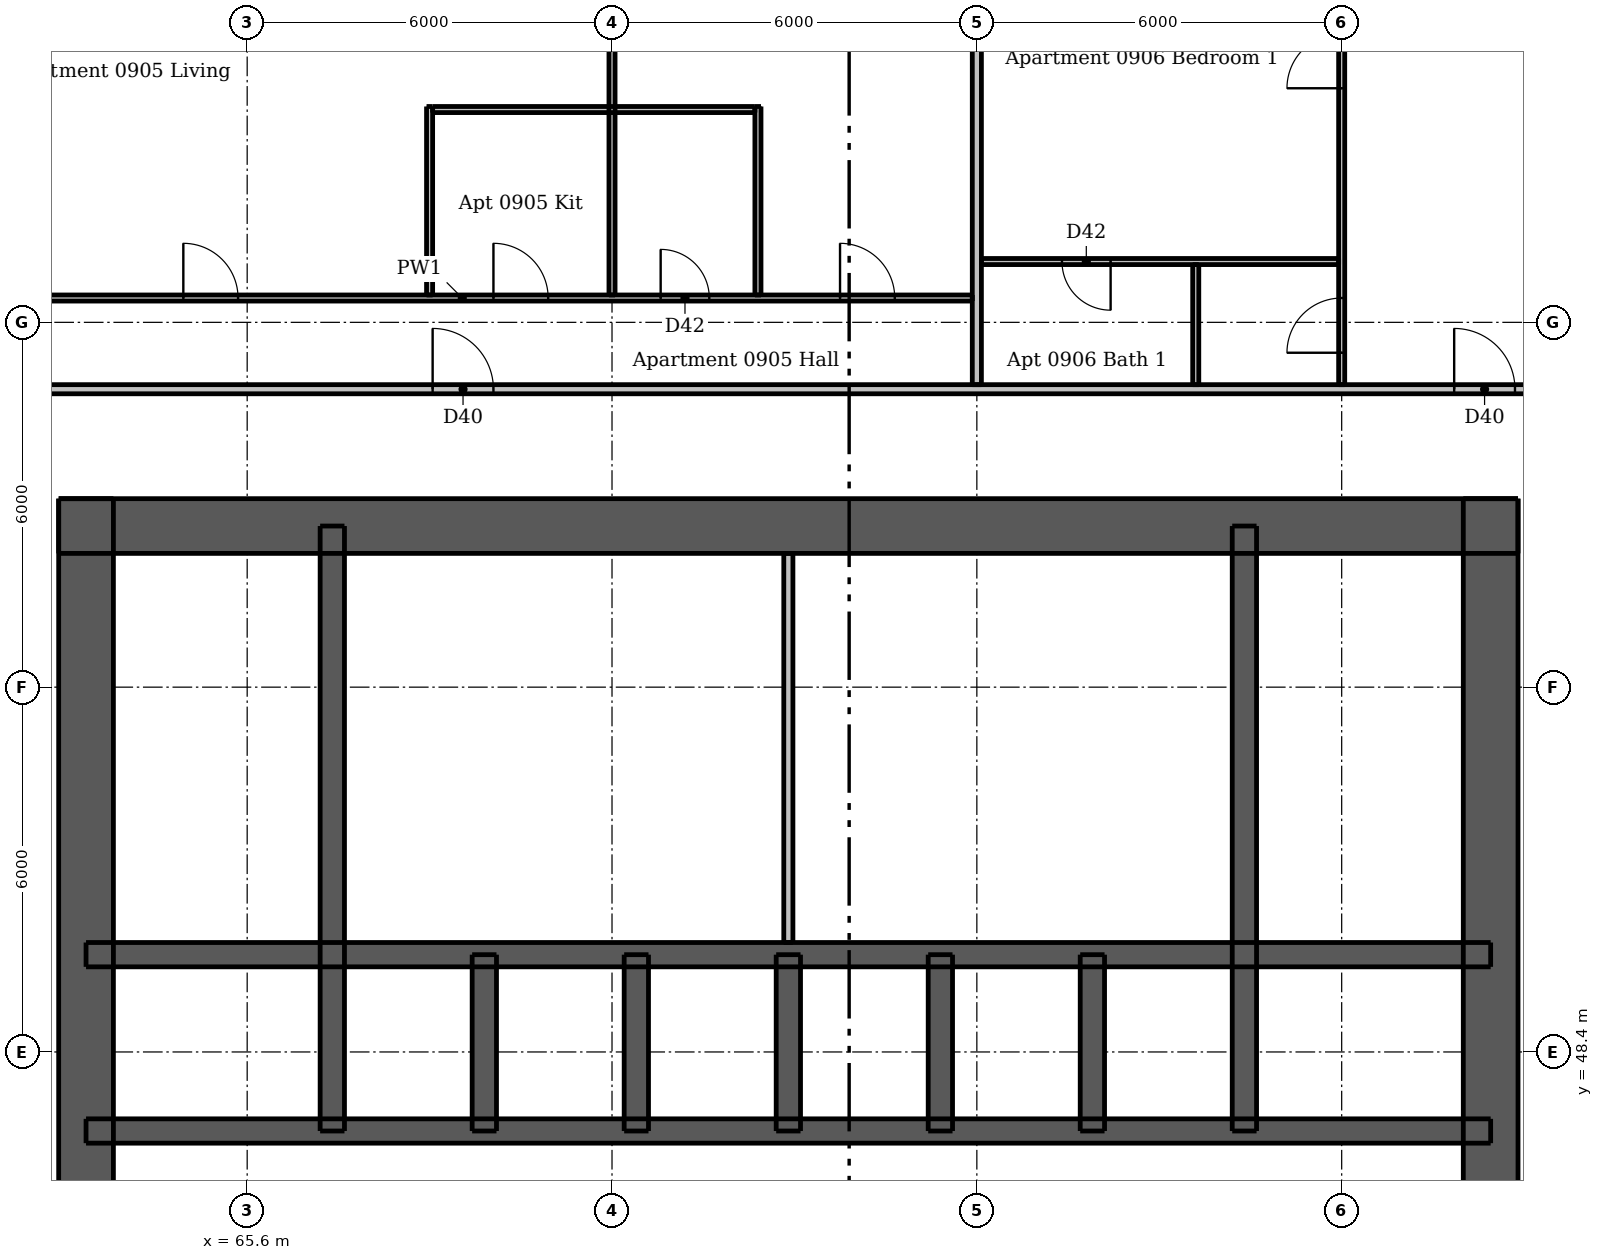
"""IFC4 building model, lengths in metres.
Left out: names, types, materials, properties, quantities, classifications, styles, units other than length and angle.
Written with IfcOpenShell. Run it as: python <this file> out.ifc"""

import sys

from ifc_helpers import new_model, si_unit, direction, frame, frame_2d, origin, place, context, subcontext, project, spatial, rectangle, extrude, element, fill, save


model = new_model("IFC4")
c1 = context("Model", 3, precision=1e-05, world=origin(), true_north=direction((0.0, 1.0)))
c2 = subcontext(c1, "Body", "Model", "MODEL_VIEW")
j1 = project(units=[si_unit("LENGTHUNIT", "METRE"), si_unit("PLANEANGLEUNIT", "RADIAN")], contexts=[c1])
p1 = place(None, origin())
s1 = spatial("IfcSite", under=j1, at=p1, CompositionType="ELEMENT")
p2 = place(p1, origin())
s2 = spatial("IfcBuilding", under=s1, at=p2, CompositionType="ELEMENT")
p3 = place(p2, frame((0.0, 0.0, 36.7)))
s3 = spatial("IfcBuildingStorey", under=s2, at=p3, CompositionType="ELEMENT", Elevation=36.7)
p4 = place(p3, frame((62.5, 57.05, 0.0), z_axis=(0.0, 0.0, 1.0), x_axis=(1.0, 0.0, 0.0)))
e1 = element("IfcWall", 1, at=p4, inside=s3, PredefinedType="SHEAR", context=c2, shape_type="SweptSolid", body=[
    extrude(rectangle(XDim=24.0, YDim=0.9, at=frame_2d((12.0, 0.0))), origin(), (0.0, 0.0, 1.0), 3.05),
])
p5 = place(p4, frame((20.85, 0.0, 0.0)))
e2 = element("IfcOpeningElement", 2, at=p5, cuts=e1, PredefinedType="OPENING", context=c2, shape_type="SweptSolid", body=[
    extrude(rectangle(XDim=1.1, YDim=2.1, at=frame_2d((0.55, 1.05))), frame((0.0, 0.46, 0.0), z_axis=(0.0, -1.0, 0.0), x_axis=(1.0, 0.0, 0.0)), (0.0, 0.0, 1.0), 0.92),
])
p6 = place(p4, frame((2.05, 0.0, 0.0)))
e3 = element("IfcOpeningElement", 3, at=p6, cuts=e1, PredefinedType="OPENING", context=c2, shape_type="SweptSolid", body=[
    extrude(rectangle(XDim=1.1, YDim=2.1, at=frame_2d((0.55, 1.05))), frame((0.0, 0.46, 0.0), z_axis=(0.0, -1.0, 0.0), x_axis=(1.0, 0.0, 0.0)), (0.0, 0.0, 1.0), 0.92),
])
p7 = place(p4, frame((7.9, 0.0, 0.0)))
e4 = element("IfcOpeningElement", 4, at=p7, cuts=e1, PredefinedType="OPENING", context=c2, shape_type="SweptSolid", body=[
    extrude(rectangle(XDim=0.9, YDim=2.1, at=frame_2d((0.45, 1.05))), frame((0.0, 0.46, 0.0), z_axis=(0.0, -1.0, 0.0), x_axis=(1.0, 0.0, 0.0)), (0.0, 0.0, 1.0), 0.92),
])
p8 = place(p4, frame((15.2, 0.0, 0.0)))
e5 = element("IfcOpeningElement", 5, at=p8, cuts=e1, PredefinedType="OPENING", context=c2, shape_type="SweptSolid", body=[
    extrude(rectangle(XDim=0.9, YDim=2.1, at=frame_2d((0.45, 1.05))), frame((0.0, 0.46, 0.0), z_axis=(0.0, -1.0, 0.0), x_axis=(1.0, 0.0, 0.0)), (0.0, 0.0, 1.0), 0.92),
])
p9 = place(p3, frame((62.95, 33.5, 0.0), z_axis=(0.0, 0.0, 1.0), x_axis=(0.0, 1.0, 0.0)))
e6 = element("IfcWall", 6, at=p9, inside=s3, PredefinedType="SHEAR", context=c2, shape_type="SweptSolid", body=[
    extrude(rectangle(XDim=24.0, YDim=0.9, at=frame_2d((12.0, 0.0))), origin(), (0.0, 0.0, 1.0), 3.05),
])
p10 = place(p9, frame((11.2, 0.0, 0.0)))
e7 = element("IfcOpeningElement", 7, at=p10, cuts=e6, PredefinedType="OPENING", context=c2, shape_type="SweptSolid", body=[
    extrude(rectangle(XDim=1.6, YDim=2.1, at=frame_2d((0.8, 1.05))), frame((0.0, 0.46, 0.0), z_axis=(0.0, -1.0, 0.0), x_axis=(1.0, 0.0, 0.0)), (0.0, 0.0, 1.0), 0.92),
])
p11 = place(p3, frame((86.05, 33.5, 0.0), z_axis=(0.0, 0.0, 1.0), x_axis=(0.0, 1.0, 0.0)))
e8 = element("IfcWall", 8, at=p11, inside=s3, PredefinedType="SHEAR", context=c2, shape_type="SweptSolid", body=[
    extrude(rectangle(XDim=24.0, YDim=0.9, at=frame_2d((12.0, 0.0))), origin(), (0.0, 0.0, 1.0), 3.05),
])
p12 = place(p11, frame((11.2, 0.0, 0.0)))
e9 = element("IfcOpeningElement", 9, at=p12, cuts=e8, PredefinedType="OPENING", context=c2, shape_type="SweptSolid", body=[
    extrude(rectangle(XDim=1.6, YDim=2.1, at=frame_2d((0.8, 1.05))), frame((0.0, 0.46, 0.0), z_axis=(0.0, -1.0, 0.0), x_axis=(1.0, 0.0, 0.0)), (0.0, 0.0, 1.0), 0.92),
])
p13 = place(p3, frame((62.95, 47.1, 0.0), z_axis=(0.0, 0.0, 1.0), x_axis=(1.0, 0.0, 0.0)))
e10 = element("IfcWall", 10, at=p13, inside=s3, PredefinedType="SHEAR", context=c2, shape_type="SweptSolid", body=[
    extrude(rectangle(XDim=23.1, YDim=0.4, at=frame_2d((11.55, 0.0))), origin(), (0.0, 0.0, 1.0), 3.05),
])
p14 = place(p13, frame((1.7, 0.0, 0.0)))
e11 = element("IfcOpeningElement", 11, at=p14, cuts=e10, PredefinedType="OPENING", context=c2, shape_type="SweptSolid", body=[
    extrude(rectangle(XDim=0.9, YDim=2.1, at=frame_2d((0.45, 1.05))), frame((0.0, 0.21, 0.0), z_axis=(0.0, -1.0, 0.0), x_axis=(1.0, 0.0, 0.0)), (0.0, 0.0, 1.0), 0.42),
])
p15 = place(p13, frame((20.5, 0.0, 0.0)))
e12 = element("IfcOpeningElement", 12, at=p15, cuts=e10, PredefinedType="OPENING", context=c2, shape_type="SweptSolid", body=[
    extrude(rectangle(XDim=0.9, YDim=2.1, at=frame_2d((0.45, 1.05))), frame((0.0, 0.21, 0.0), z_axis=(0.0, -1.0, 0.0), x_axis=(1.0, 0.0, 0.0)), (0.0, 0.0, 1.0), 0.42),
])
p16 = place(p3, frame((62.95, 50.0, 0.0), z_axis=(0.0, 0.0, 1.0), x_axis=(1.0, 0.0, 0.0)))
e13 = element("IfcWall", 13, at=p16, inside=s3, PredefinedType="SHEAR", context=c2, shape_type="SweptSolid", body=[
    extrude(rectangle(XDim=23.1, YDim=0.4, at=frame_2d((11.55, 0.0))), origin(), (0.0, 0.0, 1.0), 3.05),
])
for number, where, z_axis, x_axis in (
    (14, (67.0, 47.1, 0.0), (0.0, 0.0, 1.0), (0.0, 1.0, 0.0)),
    (15, (82.0, 47.1, 0.0), (0.0, 0.0, 1.0), (0.0, 1.0, 0.0)),
):
    element("IfcWall", number, at=place(p3, frame(where, z_axis=z_axis, x_axis=x_axis)), inside=s3, PredefinedType="SHEAR", context=c2, shape_type="SweptSolid", body=[
        extrude(rectangle(XDim=9.95, YDim=0.4, at=frame_2d((4.975, 0.0))), origin(), (0.0, 0.0, 1.0), 3.05),
    ])
for number, where, z_axis, x_axis in (
    (16, (69.5, 47.1, 0.0), (0.0, 0.0, 1.0), (0.0, 1.0, 0.0)),
    (17, (72.0, 47.1, 0.0), (0.0, 0.0, 1.0), (0.0, 1.0, 0.0)),
    (18, (74.5, 47.1, 0.0), (0.0, 0.0, 1.0), (0.0, 1.0, 0.0)),
    (19, (77.0, 47.1, 0.0), (0.0, 0.0, 1.0), (0.0, 1.0, 0.0)),
    (20, (79.5, 47.1, 0.0), (0.0, 0.0, 1.0), (0.0, 1.0, 0.0)),
):
    element("IfcWall", number, at=place(p3, frame(where, z_axis=z_axis, x_axis=x_axis)), inside=s3, PredefinedType="SHEAR", context=c2, shape_type="SweptSolid", body=[
        extrude(rectangle(XDim=2.9, YDim=0.4, at=frame_2d((1.45, 0.0))), origin(), (0.0, 0.0, 1.0), 3.05),
    ])
p17 = place(p3, frame((74.5, 50.2, 0.0), z_axis=(0.0, 0.0, 1.0), x_axis=(0.0, 1.0, 0.0)))
e21 = element("IfcWall", 21, at=p17, inside=s3, PredefinedType="PLUMBINGWALL", context=c2, shape_type="SweptSolid", body=[
    extrude(rectangle(XDim=6.4, YDim=0.15, at=frame_2d((3.2, 0.0))), origin(), (0.0, 0.0, 1.0), 3.05),
])
p18 = place(p3, frame((68.6, 60.85, 0.0), z_axis=(0.0, 0.0, 1.0), x_axis=(0.0, 1.0, 0.0)))
e22 = element("IfcWall", 22, at=p18, inside=s3, PredefinedType="PARTITIONING", context=c2, shape_type="SweptSolid", body=[
    extrude(rectangle(XDim=3.1, YDim=0.1, at=frame_2d((1.55, 0.0))), origin(), (0.0, 0.0, 1.0), 3.05),
])
p19 = place(p3, frame((71.6, 60.85, 0.0), z_axis=(0.0, 0.0, 1.0), x_axis=(0.0, 1.0, 0.0)))
e23 = element("IfcWall", 23, at=p19, inside=s3, PredefinedType="PARTITIONING", context=c2, shape_type="SweptSolid", body=[
    extrude(rectangle(XDim=7.15, YDim=0.1, at=frame_2d((3.575, 0.0))), origin(), (0.0, 0.0, 1.0), 2.516),
])
p20 = place(p3, frame((74.0, 60.85, 0.0), z_axis=(0.0, 0.0, 1.0), x_axis=(0.0, 1.0, 0.0)))
e24 = element("IfcWall", 24, at=p20, inside=s3, PredefinedType="PARTITIONING", context=c2, shape_type="SweptSolid", body=[
    extrude(rectangle(XDim=3.1, YDim=0.1, at=frame_2d((1.55, 0.0))), origin(), (0.0, 0.0, 1.0), 3.05),
])
p21 = place(p3, frame((81.2, 59.375, 0.0), z_axis=(0.0, 0.0, 1.0), x_axis=(0.0, 1.0, 0.0)))
e25 = element("IfcWall", 25, at=p21, inside=s3, PredefinedType="PARTITIONING", context=c2, shape_type="SweptSolid", body=[
    extrude(rectangle(XDim=1.975, YDim=0.1, at=frame_2d((0.988, 0.0))), origin(), (0.0, 0.0, 1.0), 3.05),
])
p22 = place(p3, frame((83.6, 59.375, 0.0), z_axis=(0.0, 0.0, 1.0), x_axis=(0.0, 1.0, 0.0)))
e26 = element("IfcWall", 26, at=p22, inside=s3, PredefinedType="PARTITIONING", context=c2, shape_type="SweptSolid", body=[
    extrude(rectangle(XDim=8.625, YDim=0.1, at=frame_2d((4.312, 0.0))), origin(), (0.0, 0.0, 1.0), 2.516),
])
p23 = place(p22, frame((0.525, 0.0, 0.0)))
e27 = element("IfcOpeningElement", 27, at=p23, cuts=e26, PredefinedType="OPENING", context=c2, shape_type="SweptSolid", body=[
    extrude(rectangle(XDim=0.9, YDim=2.1, at=frame_2d((0.45, 1.05))), frame((0.0, 0.06, 0.0), z_axis=(0.0, -1.0, 0.0), x_axis=(1.0, 0.0, 0.0)), (0.0, 0.0, 1.0), 0.12),
])
p24 = place(p22, frame((4.875, 0.0, 0.0)))
e28 = element("IfcOpeningElement", 28, at=p24, cuts=e26, PredefinedType="OPENING", context=c2, shape_type="SweptSolid", body=[
    extrude(rectangle(XDim=0.9, YDim=2.1, at=frame_2d((0.45, 1.05))), frame((0.0, 0.06, 0.0), z_axis=(0.0, -1.0, 0.0), x_axis=(1.0, 0.0, 0.0)), (0.0, 0.0, 1.0), 0.12),
])
p25 = place(p3, frame((68.65, 63.9, 0.0), z_axis=(0.0, 0.0, 1.0), x_axis=(1.0, 0.0, 0.0)))
e29 = element("IfcWall", 29, at=p25, inside=s3, PredefinedType="PARTITIONING", context=c2, shape_type="SweptSolid", body=[
    extrude(rectangle(XDim=5.3, YDim=0.1, at=frame_2d((2.65, 0.0))), origin(), (0.0, 0.0, 1.0), 3.05),
])
p26 = place(p3, frame((83.55, 61.4, 0.0), z_axis=(0.0, 0.0, 1.0), x_axis=(-1.0, 0.0, 0.0)))
e30 = element("IfcWall", 30, at=p26, inside=s3, PredefinedType="PARTITIONING", context=c2, shape_type="SweptSolid", body=[
    extrude(rectangle(XDim=5.875, YDim=0.1, at=frame_2d((2.938, 0.0))), origin(), (0.0, 0.0, 1.0), 3.05),
])
p27 = place(p26, frame((3.75, 0.0, 0.0)))
e31 = element("IfcOpeningElement", 31, at=p27, cuts=e30, PredefinedType="OPENING", context=c2, shape_type="SweptSolid", body=[
    extrude(rectangle(XDim=0.8, YDim=2.1, at=frame_2d((0.4, 1.05))), frame((0.0, 0.06, 0.0), z_axis=(0.0, -1.0, 0.0), x_axis=(1.0, 0.0, 0.0)), (0.0, 0.0, 1.0), 0.12),
])
p28 = place(p3, frame((60.75, 60.8, 0.0), z_axis=(0.0, 0.0, 1.0), x_axis=(1.0, 0.0, 0.0)))
e32 = element("IfcWall", 32, at=p28, inside=s3, PredefinedType="PARTITIONING", context=c2, shape_type="SweptSolid", body=[
    extrude(rectangle(XDim=16.775, YDim=0.1, at=frame_2d((8.387, 0.0))), origin(), (0.0, 0.0, 1.0), 3.05),
])
p29 = place(p28, frame((3.8, 0.0, 0.0)))
e33 = element("IfcOpeningElement", 33, at=p29, cuts=e32, PredefinedType="OPENING", context=c2, shape_type="SweptSolid", body=[
    extrude(rectangle(XDim=0.9, YDim=2.1, at=frame_2d((0.45, 1.05))), frame((0.0, 0.06, 0.0), z_axis=(0.0, -1.0, 0.0), x_axis=(1.0, 0.0, 0.0)), (0.0, 0.0, 1.0), 0.12),
])
p30 = place(p28, frame((8.9, 0.0, 0.0)))
e34 = element("IfcOpeningElement", 34, at=p30, cuts=e32, PredefinedType="OPENING", context=c2, shape_type="SweptSolid", body=[
    extrude(rectangle(XDim=0.9, YDim=2.1, at=frame_2d((0.45, 1.05))), frame((0.0, 0.06, 0.0), z_axis=(0.0, -1.0, 0.0), x_axis=(1.0, 0.0, 0.0)), (0.0, 0.0, 1.0), 0.12),
])
p31 = place(p28, frame((14.6, 0.0, 0.0)))
e35 = element("IfcOpeningElement", 35, at=p31, cuts=e32, PredefinedType="OPENING", context=c2, shape_type="SweptSolid", body=[
    extrude(rectangle(XDim=0.9, YDim=2.1, at=frame_2d((0.45, 1.05))), frame((0.0, 0.06, 0.0), z_axis=(0.0, -1.0, 0.0), x_axis=(1.0, 0.0, 0.0)), (0.0, 0.0, 1.0), 0.12),
])
p32 = place(p28, frame((11.65, 0.0, 0.0)))
e36 = element("IfcOpeningElement", 36, at=p32, cuts=e32, PredefinedType="OPENING", context=c2, shape_type="SweptSolid", body=[
    extrude(rectangle(XDim=0.8, YDim=2.1, at=frame_2d((0.4, 1.05))), frame((0.0, 0.06, 0.0), z_axis=(0.0, -1.0, 0.0), x_axis=(1.0, 0.0, 0.0)), (0.0, 0.0, 1.0), 0.12),
])
p33 = place(p3, frame((77.6, 59.375, 0.0), z_axis=(0.0, 0.0, 1.0), x_axis=(0.0, 1.0, 0.0)))
e37 = element("IfcWall", 37, at=p33, inside=s3, PredefinedType="PARTITIONING", context=c2, shape_type="SweptSolid", body=[
    extrude(rectangle(XDim=8.625, YDim=0.15, at=frame_2d((4.312, 0.0))), origin(), (0.0, 0.0, 1.0), 2.516),
])
p34 = place(p3, frame((59.675, 59.3, 0.0), z_axis=(0.0, 0.0, 1.0), x_axis=(1.0, 0.0, 0.0)))
e38 = element("IfcWall", 38, at=p34, inside=s3, PredefinedType="PARTITIONING", context=c2, shape_type="SweptSolid", body=[
    extrude(rectangle(XDim=28.55, YDim=0.15, at=frame_2d((14.275, 0.0))), origin(), (0.0, 0.0, 1.0), 3.05),
])
p35 = place(p34, frame((8.975, 0.0, 0.0)))
e39 = element("IfcOpeningElement", 39, at=p35, cuts=e38, PredefinedType="OPENING", context=c2, shape_type="SweptSolid", body=[
    extrude(rectangle(XDim=1.0, YDim=2.1, at=frame_2d((0.5, 1.05))), frame((0.0, 0.085, 0.0), z_axis=(0.0, -1.0, 0.0), x_axis=(1.0, 0.0, 0.0)), (0.0, 0.0, 1.0), 0.17),
])
p36 = place(p34, frame((25.775, 0.0, 0.0)))
e40 = element("IfcOpeningElement", 40, at=p36, cuts=e38, PredefinedType="OPENING", context=c2, shape_type="SweptSolid", body=[
    extrude(rectangle(XDim=1.0, YDim=2.1, at=frame_2d((0.5, 1.05))), frame((0.0, 0.085, 0.0), z_axis=(0.0, -1.0, 0.0), x_axis=(1.0, 0.0, 0.0)), (0.0, 0.0, 1.0), 0.17),
])
p37 = place(p5, origin())
e41 = element("IfcDoor", 41, at=p37, inside=s3, OperationType="SINGLE_SWING_RIGHT", PredefinedType="DOOR", context=c2, shape_type="SweptSolid", body=[
    extrude(rectangle(XDim=1.1, YDim=2.1, at=frame_2d((0.55, 1.05))), frame((0.0, -0.388, 0.0), z_axis=(0.0, -1.0, 0.0), x_axis=(1.0, 0.0, 0.0)), (0.0, 0.0, 1.0), 0.05),
])
fill(e2, e41)
p38 = place(p6, origin())
e42 = element("IfcDoor", 42, at=p38, inside=s3, OperationType="SINGLE_SWING_LEFT", PredefinedType="DOOR", context=c2, shape_type="SweptSolid", body=[
    extrude(rectangle(XDim=1.1, YDim=2.1, at=frame_2d((0.55, 1.05))), frame((0.0, -0.388, 0.0), z_axis=(0.0, -1.0, 0.0), x_axis=(1.0, 0.0, 0.0)), (0.0, 0.0, 1.0), 0.05),
])
fill(e3, e42)
p39 = place(p14, origin())
e43 = element("IfcDoor", 43, at=p39, inside=s3, OperationType="SINGLE_SWING_LEFT", PredefinedType="DOOR", context=c2, shape_type="SweptSolid", body=[
    extrude(rectangle(XDim=0.9, YDim=2.1, at=frame_2d((0.45, 1.05))), frame((0.0, 0.188, 0.0), z_axis=(0.0, -1.0, 0.0), x_axis=(1.0, 0.0, 0.0)), (0.0, 0.0, 1.0), 0.05),
])
fill(e11, e43)
p40 = place(p15, origin())
e44 = element("IfcDoor", 44, at=p40, inside=s3, OperationType="SINGLE_SWING_LEFT", PredefinedType="DOOR", context=c2, shape_type="SweptSolid", body=[
    extrude(rectangle(XDim=0.9, YDim=2.1, at=frame_2d((0.45, 1.05))), frame((0.0, 0.188, 0.0), z_axis=(0.0, -1.0, 0.0), x_axis=(1.0, 0.0, 0.0)), (0.0, 0.0, 1.0), 0.05),
])
fill(e12, e44)
p41 = place(p7, origin())
e45 = element("IfcDoor", 45, at=p41, inside=s3, OperationType="SINGLE_SWING_RIGHT", PredefinedType="DOOR", context=c2, shape_type="SweptSolid", body=[
    extrude(rectangle(XDim=0.9, YDim=2.1, at=frame_2d((0.45, 1.05))), frame((0.0, -0.388, 0.0), z_axis=(0.0, -1.0, 0.0), x_axis=(1.0, 0.0, 0.0)), (0.0, 0.0, 1.0), 0.05),
])
fill(e4, e45)
p42 = place(p8, origin())
e46 = element("IfcDoor", 46, at=p42, inside=s3, OperationType="SINGLE_SWING_RIGHT", PredefinedType="DOOR", context=c2, shape_type="SweptSolid", body=[
    extrude(rectangle(XDim=0.9, YDim=2.1, at=frame_2d((0.45, 1.05))), frame((0.0, -0.388, 0.0), z_axis=(0.0, -1.0, 0.0), x_axis=(1.0, 0.0, 0.0)), (0.0, 0.0, 1.0), 0.05),
])
fill(e5, e46)
p43 = place(p35, origin())
e47 = element("IfcDoor", 47, at=p43, inside=s3, OperationType="SINGLE_SWING_LEFT", PredefinedType="DOOR", context=c2, shape_type="SweptSolid", body=[
    extrude(rectangle(XDim=1.0, YDim=2.1, at=frame_2d((0.5, 1.05))), frame((0.0, 0.025, 0.0), z_axis=(0.0, -1.0, 0.0), x_axis=(1.0, 0.0, 0.0)), (0.0, 0.0, 1.0), 0.05),
])
fill(e39, e47)
p44 = place(p29, origin())
e48 = element("IfcDoor", 48, at=p44, inside=s3, OperationType="SINGLE_SWING_LEFT", PredefinedType="DOOR", context=c2, shape_type="SweptSolid", body=[
    extrude(rectangle(XDim=0.9, YDim=2.1, at=frame_2d((0.45, 1.05))), frame((0.0, 0.025, 0.0), z_axis=(0.0, -1.0, 0.0), x_axis=(1.0, 0.0, 0.0)), (0.0, 0.0, 1.0), 0.05),
])
fill(e33, e48)
p45 = place(p30, origin())
e49 = element("IfcDoor", 49, at=p45, inside=s3, OperationType="SINGLE_SWING_LEFT", PredefinedType="DOOR", context=c2, shape_type="SweptSolid", body=[
    extrude(rectangle(XDim=0.9, YDim=2.1, at=frame_2d((0.45, 1.05))), frame((0.0, 0.025, 0.0), z_axis=(0.0, -1.0, 0.0), x_axis=(1.0, 0.0, 0.0)), (0.0, 0.0, 1.0), 0.05),
])
fill(e34, e49)
p46 = place(p31, origin())
e50 = element("IfcDoor", 50, at=p46, inside=s3, OperationType="SINGLE_SWING_LEFT", PredefinedType="DOOR", context=c2, shape_type="SweptSolid", body=[
    extrude(rectangle(XDim=0.9, YDim=2.1, at=frame_2d((0.45, 1.05))), frame((0.0, 0.025, 0.0), z_axis=(0.0, -1.0, 0.0), x_axis=(1.0, 0.0, 0.0)), (0.0, 0.0, 1.0), 0.05),
])
fill(e35, e50)
p47 = place(p32, origin())
e51 = element("IfcDoor", 51, at=p47, inside=s3, OperationType="SINGLE_SWING_LEFT", PredefinedType="DOOR", context=c2, shape_type="SweptSolid", body=[
    extrude(rectangle(XDim=0.8, YDim=2.1, at=frame_2d((0.4, 1.05))), frame((0.0, 0.025, 0.0), z_axis=(0.0, -1.0, 0.0), x_axis=(1.0, 0.0, 0.0)), (0.0, 0.0, 1.0), 0.05),
])
fill(e36, e51)
p48 = place(p36, origin())
e52 = element("IfcDoor", 52, at=p48, inside=s3, OperationType="SINGLE_SWING_LEFT", PredefinedType="DOOR", context=c2, shape_type="SweptSolid", body=[
    extrude(rectangle(XDim=1.0, YDim=2.1, at=frame_2d((0.5, 1.05))), frame((0.0, 0.025, 0.0), z_axis=(0.0, -1.0, 0.0), x_axis=(1.0, 0.0, 0.0)), (0.0, 0.0, 1.0), 0.05),
])
fill(e40, e52)
p49 = place(p23, origin())
e53 = element("IfcDoor", 53, at=p49, inside=s3, OperationType="SINGLE_SWING_LEFT", PredefinedType="DOOR", context=c2, shape_type="SweptSolid", body=[
    extrude(rectangle(XDim=0.9, YDim=2.1, at=frame_2d((0.45, 1.05))), frame((0.0, 0.025, 0.0), z_axis=(0.0, -1.0, 0.0), x_axis=(1.0, 0.0, 0.0)), (0.0, 0.0, 1.0), 0.05),
])
fill(e27, e53)
p50 = place(p24, origin())
e54 = element("IfcDoor", 54, at=p50, inside=s3, OperationType="SINGLE_SWING_LEFT", PredefinedType="DOOR", context=c2, shape_type="SweptSolid", body=[
    extrude(rectangle(XDim=0.9, YDim=2.1, at=frame_2d((0.45, 1.05))), frame((0.0, 0.025, 0.0), z_axis=(0.0, -1.0, 0.0), x_axis=(1.0, 0.0, 0.0)), (0.0, 0.0, 1.0), 0.05),
])
fill(e28, e54)
p51 = place(p27, origin())
e55 = element("IfcDoor", 55, at=p51, inside=s3, OperationType="SINGLE_SWING_LEFT", PredefinedType="DOOR", context=c2, shape_type="SweptSolid", body=[
    extrude(rectangle(XDim=0.8, YDim=2.1, at=frame_2d((0.4, 1.05))), frame((0.0, 0.025, 0.0), z_axis=(0.0, -1.0, 0.0), x_axis=(1.0, 0.0, 0.0)), (0.0, 0.0, 1.0), 0.05),
])
fill(e31, e55)
save(model, sys.argv[1])
